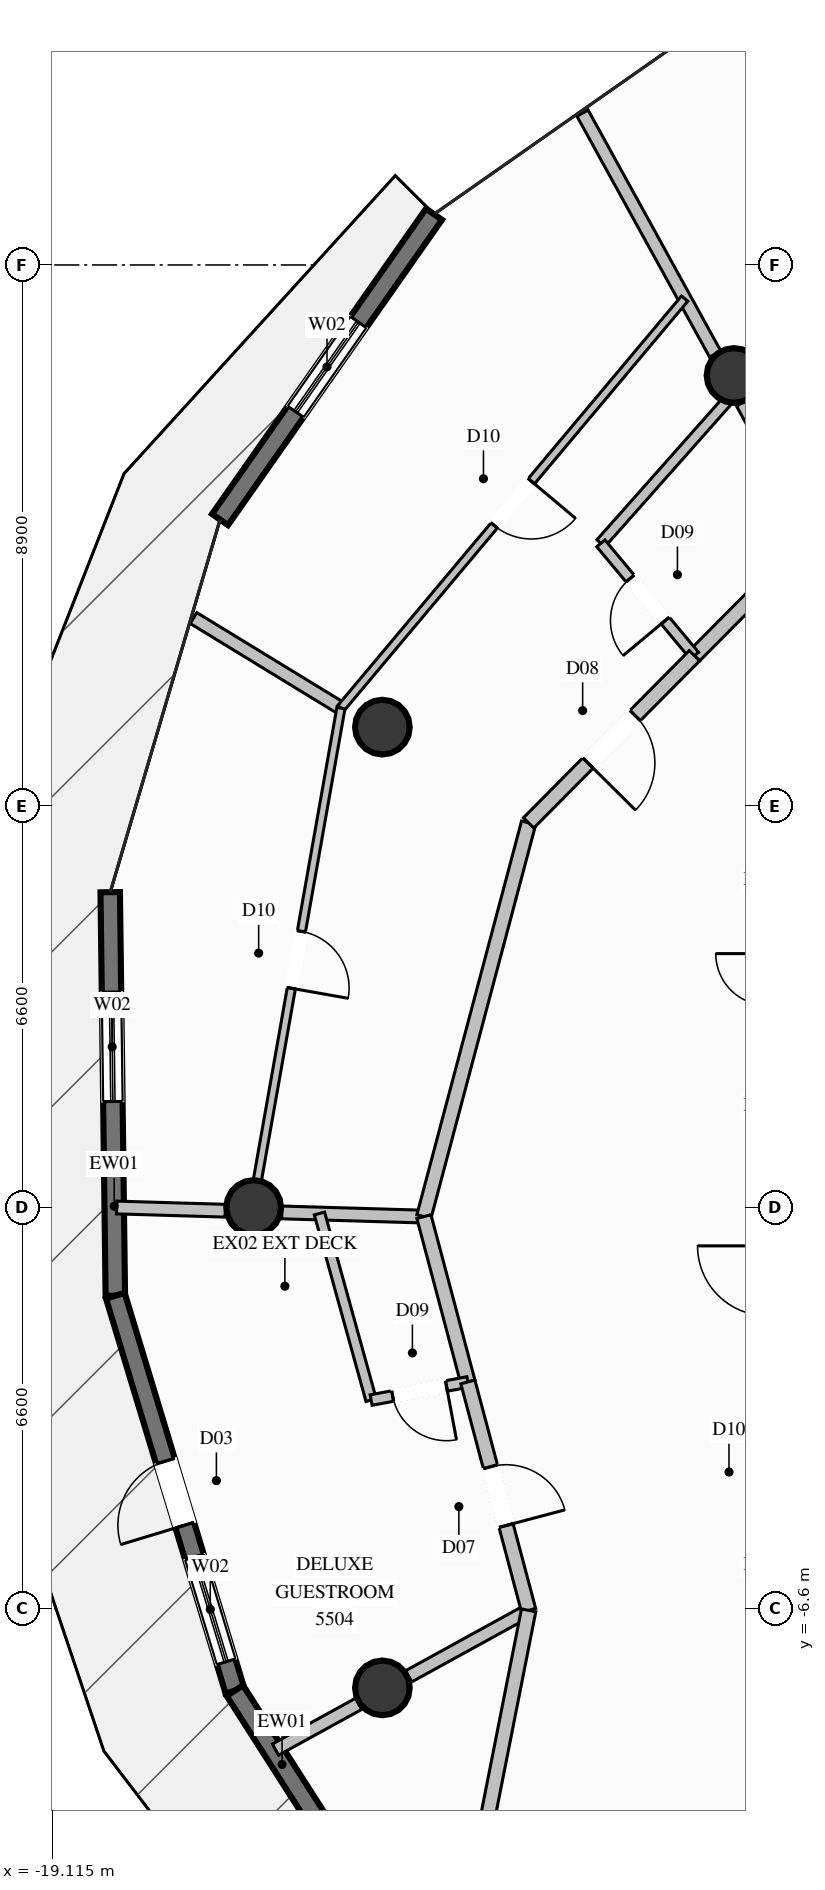
"""IFC4 building model, lengths in metres.
Left out: names, types, materials, properties, quantities, classifications, styles, units other than length and angle.
Written with IfcOpenShell. Run it as: python <this file> out.ifc"""

import sys

from ifc_helpers import new_model, si_unit, direction, frame, frame_2d, origin, origin_2d, place, context, subcontext, project, spatial, rectangle, circle, extrude, element, fill, save


model = new_model("IFC4")
c1 = context("Model", 3, precision=1e-05, world=origin(), true_north=direction((0.0, 1.0)))
c2 = subcontext(c1, "Body", "Model", "MODEL_VIEW")
j1 = project(units=[si_unit("LENGTHUNIT", "METRE"), si_unit("PLANEANGLEUNIT", "RADIAN")], contexts=[c1])
p1 = place(None, origin())
s1 = spatial("IfcSite", under=j1, at=p1, CompositionType="ELEMENT")
p2 = place(p1, origin())
s2 = spatial("IfcBuilding", under=s1, at=p2, CompositionType="ELEMENT")
p3 = place(p2, frame((0.0, 0.0, 205.6)))
s3 = spatial("IfcBuildingStorey", under=s2, at=p3, CompositionType="ELEMENT", Elevation=205.6)
for number, where, z_axis, x_axis in (
    (1, (-7.9, 13.683, 0.0), (0.0, 0.0, 1.0), (1.0, 0.0, 0.0)),
    (2, (-13.683, 7.9, 0.0), (0.0, 0.0, 1.0), (1.0, 0.0, 0.0)),
    (3, (-15.8, 0.0, 0.0), (0.0, 0.0, 1.0), (1.0, 0.0, 0.0)),
    (4, (-13.683, -7.9, 0.0), (0.0, 0.0, 1.0), (1.0, 0.0, 0.0)),
):
    element("IfcColumn", number, at=place(p3, frame(where, z_axis=z_axis, x_axis=x_axis)), inside=s3, PredefinedType="COLUMN", context=c2, shape_type="SweptSolid", body=[
        extrude(circle(Radius=0.45, at=origin_2d()), origin(), (0.0, 0.0, 1.0), 3.6),
    ])
p4 = place(p3, frame((-16.353, 11.313, 0.0), z_axis=(0.0, 0.0, 1.0), x_axis=(0.573863076695, 0.818951261802, 0.0)))
e5 = element("IfcWall", 5, at=p4, inside=s3, PredefinedType="SOLIDWALL", context=c2, shape_type="SweptSolid", body=[
    extrude(rectangle(XDim=6.132, YDim=0.32, at=frame_2d((3.066, 0.0))), origin(), (0.0, 0.0, 1.0), 3.36),
])
p5 = place(p4, frame((2.166, 0.0, 0.35)))
e6 = element("IfcOpeningElement", 6, at=p5, cuts=e5, PredefinedType="OPENING", context=c2, shape_type="SweptSolid", body=[
    extrude(rectangle(XDim=1.8, YDim=2.6, at=frame_2d((0.9, 1.3))), frame((0.0, 0.17, 0.0), z_axis=(0.0, -1.0, 0.0), x_axis=(1.0, 0.0, 0.0)), (0.0, 0.0, 1.0), 0.34),
])
p6 = place(p3, frame((-18.075, -1.451, 0.0), z_axis=(0.0, 0.0, 1.0), x_axis=(-0.012654885904, 0.999919923725, 0.0)))
e7 = element("IfcWall", 7, at=p6, inside=s3, PredefinedType="SOLIDWALL", context=c2, shape_type="SweptSolid", body=[
    extrude(rectangle(XDim=6.636, YDim=0.32, at=frame_2d((3.318, 0.0))), origin(), (0.0, 0.0, 1.0), 3.36),
])
p7 = place(p6, frame((3.194, 0.0, 0.35)))
e8 = element("IfcOpeningElement", 8, at=p7, cuts=e7, PredefinedType="OPENING", context=c2, shape_type="SweptSolid", body=[
    extrude(rectangle(XDim=1.8, YDim=2.6, at=frame_2d((0.9, 1.3))), frame((0.0, 0.17, 0.0), z_axis=(0.0, -1.0, 0.0), x_axis=(1.0, 0.0, 0.0)), (0.0, 0.0, 1.0), 0.34),
])
p8 = place(p3, frame((-16.109, -7.945, 0.0), z_axis=(0.0, 0.0, 1.0), x_axis=(-0.289756727298, 0.957100328589, 0.0)))
e9 = element("IfcWall", 9, at=p8, inside=s3, PredefinedType="SOLIDWALL", context=c2, shape_type="SweptSolid", body=[
    extrude(rectangle(XDim=6.785, YDim=0.32, at=frame_2d((3.393, 0.0))), origin(), (0.0, 0.0, 1.0), 3.36),
])
p9 = place(p8, frame((0.496, 0.0, 0.35)))
e10 = element("IfcOpeningElement", 10, at=p9, cuts=e9, PredefinedType="OPENING", context=c2, shape_type="SweptSolid", body=[
    extrude(rectangle(XDim=1.8, YDim=2.6, at=frame_2d((0.9, 1.3))), frame((0.0, 0.17, 0.0), z_axis=(0.0, -1.0, 0.0), x_axis=(1.0, 0.0, 0.0)), (0.0, 0.0, 1.0), 0.34),
])
p10 = place(p8, frame((2.843, 0.0, 0.0)))
e11 = element("IfcOpeningElement", 11, at=p10, cuts=e9, PredefinedType="OPENING", context=c2, shape_type="SweptSolid", body=[
    extrude(rectangle(XDim=1.1, YDim=2.2, at=frame_2d((0.55, 1.1))), frame((0.0, 0.17, 0.0), z_axis=(0.0, -1.0, 0.0), x_axis=(1.0, 0.0, 0.0)), (0.0, 0.0, 1.0), 0.34),
])
p11 = place(p3, frame((-12.454, -13.662, 0.0), z_axis=(0.0, 0.0, 1.0), x_axis=(-0.538622762642, 0.842547042938, 0.0)))
e12 = element("IfcWall", 12, at=p11, inside=s3, PredefinedType="SOLIDWALL", context=c2, shape_type="SweptSolid", body=[
    extrude(rectangle(XDim=6.785, YDim=0.32, at=frame_2d((3.393, 0.0))), origin(), (0.0, 0.0, 1.0), 3.36),
])
p12 = place(p11, frame((1.854, 0.0, 0.35)))
e13 = element("IfcOpeningElement", 13, at=p12, cuts=e12, PredefinedType="OPENING", context=c2, shape_type="SweptSolid", body=[
    extrude(rectangle(XDim=1.8, YDim=2.6, at=frame_2d((0.9, 1.3))), frame((0.0, 0.17, 0.0), z_axis=(0.0, -1.0, 0.0), x_axis=(1.0, 0.0, 0.0)), (0.0, 0.0, 1.0), 0.34),
])
p13 = place(p3, frame((-6.575, 11.065, 0.0), z_axis=(0.0, 0.0, 1.0), x_axis=(-0.482312715348, 0.875999112222, 0.0)))
e14 = element("IfcWall", 14, at=p13, inside=s3, PredefinedType="PARTITIONING", context=c2, shape_type="SweptSolid", body=[
    extrude(rectangle(XDim=2.474, YDim=0.21, at=frame_2d((1.237, 0.0))), origin(), (0.0, 0.0, 1.0), 2.877),
])
p14 = place(p3, frame((-8.21, 14.036, 0.0), z_axis=(0.0, 0.0, 1.0), x_axis=(-0.482343563711, 0.875982126842, 0.0)))
e15 = element("IfcWall", 15, at=p14, inside=s3, PredefinedType="PARTITIONING", context=c2, shape_type="SweptSolid", body=[
    extrude(rectangle(XDim=4.522, YDim=0.21, at=frame_2d((2.261, 0.0))), origin(), (0.0, 0.0, 1.0), 3.36),
])
p15 = place(p3, frame((-13.0, -0.15, 0.0), z_axis=(0.0, 0.0, 1.0), x_axis=(-0.999566309164, 0.029448150771, 0.0)))
e16 = element("IfcWall", 16, at=p15, inside=s3, PredefinedType="PARTITIONING", context=c2, shape_type="SweptSolid", body=[
    extrude(rectangle(XDim=2.338, YDim=0.21, at=frame_2d((1.169, 0.0))), origin(), (0.0, 0.0, 1.0), 3.36),
])
p16 = place(p3, frame((-16.267, -0.053, 0.0), z_axis=(0.0, 0.0, 1.0), x_axis=(-0.999560281957, 0.029652027503, 0.0)))
e17 = element("IfcWall", 17, at=p16, inside=s3, PredefinedType="PARTITIONING", context=c2, shape_type="SweptSolid", body=[
    extrude(rectangle(XDim=1.787, YDim=0.21, at=frame_2d((0.893, 0.0))), origin(), (0.0, 0.0, 1.0), 3.36),
])
p17 = place(p3, frame((-11.278, -6.625, 0.0), z_axis=(0.0, 0.0, 1.0), x_axis=(-0.876259360779, -0.481839737513, 0.0)))
e18 = element("IfcWall", 18, at=p17, inside=s3, PredefinedType="PARTITIONING", context=c2, shape_type="SweptSolid", body=[
    extrude(rectangle(XDim=2.254, YDim=0.21, at=frame_2d((1.127, 0.0))), origin(), (0.0, 0.0, 1.0), 2.877),
])
p18 = place(p3, frame((-14.073, -8.162, 0.0), z_axis=(0.0, 0.0, 1.0), x_axis=(-0.876060708042, -0.482200825201, 0.0)))
e19 = element("IfcWall", 19, at=p18, inside=s3, PredefinedType="PARTITIONING", context=c2, shape_type="SweptSolid", body=[
    extrude(rectangle(XDim=1.562, YDim=0.21, at=frame_2d((0.781, 0.0))), origin(), (0.0, 0.0, 1.0), 3.36),
])
p19 = place(p3, frame((-6.575, 11.065, 0.0), z_axis=(0.0, 0.0, 1.0), x_axis=(-0.704271845888, -0.709930395947, 0.0)))
e20 = element("IfcWall", 20, at=p19, inside=s3, PredefinedType="PARTITIONING", context=c2, shape_type="SweptSolid", body=[
    extrude(rectangle(XDim=2.804, YDim=0.24, at=frame_2d((1.402, 0.0))), origin(), (0.0, 0.0, 1.0), 3.36),
])
p20 = place(p3, frame((-7.872, 13.422, 0.0), z_axis=(0.0, 0.0, 1.0), x_axis=(-0.663660752153, -0.748033693126, 0.0)))
e21 = element("IfcWall", 21, at=p20, inside=s3, PredefinedType="PLUMBINGWALL", context=c2, shape_type="SweptSolid", body=[
    extrude(rectangle(XDim=3.342, YDim=0.175, at=frame_2d((1.671, 0.0))), origin(), (0.0, 0.0, 1.0), 2.929),
])
p21 = place(p3, frame((-8.55, 9.074, 0.0), z_axis=(0.0, 0.0, 1.0), x_axis=(-0.640164435278, 0.768237916147, 0.0)))
e22 = element("IfcWall", 22, at=p21, inside=s3, PredefinedType="PLUMBINGWALL", context=c2, shape_type="SweptSolid", body=[
    extrude(rectangle(XDim=2.406, YDim=0.175, at=frame_2d((1.203, 0.0))), origin(), (0.0, 0.0, 1.0), 3.36),
])
p22 = place(p21, frame((0.753, 0.0, 0.0)))
e23 = element("IfcOpeningElement", 23, at=p22, cuts=e22, PredefinedType="OPENING", context=c2, shape_type="SweptSolid", body=[
    extrude(rectangle(XDim=0.9, YDim=2.1, at=frame_2d((0.45, 1.05))), frame((0.0, 0.098, 0.0), z_axis=(0.0, -1.0, 0.0), x_axis=(1.0, 0.0, 0.0)), (0.0, 0.0, 1.0), 0.195),
])
p23 = place(p3, frame((-14.365, 8.212, 0.0), z_axis=(0.0, 0.0, 1.0), x_axis=(-0.853249981301, 0.521502127905, 0.0)))
e24 = element("IfcWall", 24, at=p23, inside=s3, PredefinedType="PARTITIONING", context=c2, shape_type="SweptSolid", body=[
    extrude(rectangle(XDim=2.842, YDim=0.21, at=frame_2d((1.421, 0.0))), origin(), (0.0, 0.0, 1.0), 3.36),
])
p24 = place(p3, frame((-11.278, 6.325, 0.0), z_axis=(0.0, 0.0, 1.0), x_axis=(-0.257007135557, -0.966409505475, 0.0)))
e25 = element("IfcWall", 25, at=p24, inside=s3, PredefinedType="PARTITIONING", context=c2, shape_type="SweptSolid", body=[
    extrude(rectangle(XDim=6.7, YDim=0.24, at=frame_2d((3.35, 0.0))), origin(), (0.0, 0.0, 1.0), 3.36),
])
p25 = place(p3, frame((-8.55, 9.074, 0.0), z_axis=(0.0, 0.0, 1.0), x_axis=(-0.704390934975, -0.709812236246, 0.0)))
e26 = element("IfcWall", 26, at=p25, inside=s3, PredefinedType="PARTITIONING", context=c2, shape_type="SweptSolid", body=[
    extrude(rectangle(XDim=3.873, YDim=0.24, at=frame_2d((1.937, 0.0))), origin(), (0.0, 0.0, 1.0), 3.36),
])
p26 = place(p25, frame((1.386, 0.0, 0.0)))
e27 = element("IfcOpeningElement", 27, at=p26, cuts=e26, PredefinedType="OPENING", context=c2, shape_type="SweptSolid", body=[
    extrude(rectangle(XDim=1.1, YDim=2.3, at=frame_2d((0.55, 1.15))), frame((0.0, 0.13, 0.0), z_axis=(0.0, -1.0, 0.0), x_axis=(1.0, 0.0, 0.0)), (0.0, 0.0, 1.0), 0.26),
])
p27 = place(p3, frame((-8.712, 14.947, 0.0), z_axis=(0.0, 0.0, 1.0), x_axis=(-0.642897719882, -0.765952036208, 0.0)))
e28 = element("IfcWall", 28, at=p27, inside=s3, PredefinedType="PARTITIONING", context=c2, shape_type="SweptSolid", body=[
    extrude(rectangle(XDim=8.793, YDim=0.135, at=frame_2d((4.396, 0.0))), origin(), (0.0, 0.0, 1.0), 3.36),
])
p28 = place(p27, frame((3.921, 0.0, 0.0)))
e29 = element("IfcOpeningElement", 29, at=p28, cuts=e28, PredefinedType="OPENING", context=c2, shape_type="SweptSolid", body=[
    extrude(rectangle(XDim=0.95, YDim=2.1, at=frame_2d((0.475, 1.05))), frame((0.0, 0.078, 0.0), z_axis=(0.0, -1.0, 0.0), x_axis=(1.0, 0.0, 0.0)), (0.0, 0.0, 1.0), 0.155),
])
p29 = place(p3, frame((-14.365, 8.212, 0.0), z_axis=(0.0, 0.0, 1.0), x_axis=(-0.174280681656, -0.984696016038, 0.0)))
e30 = element("IfcWall", 30, at=p29, inside=s3, PredefinedType="PARTITIONING", context=c2, shape_type="SweptSolid", body=[
    extrude(rectangle(XDim=8.406, YDim=0.135, at=frame_2d((4.203, 0.0))), origin(), (0.0, 0.0, 1.0), 2.929),
])
p30 = place(p29, frame((3.728, 0.0, 0.0)))
e31 = element("IfcOpeningElement", 31, at=p30, cuts=e30, PredefinedType="OPENING", context=c2, shape_type="SweptSolid", body=[
    extrude(rectangle(XDim=0.95, YDim=2.1, at=frame_2d((0.475, 1.05))), frame((0.0, 0.078, 0.0), z_axis=(0.0, -1.0, 0.0), x_axis=(1.0, 0.0, 0.0)), (0.0, 0.0, 1.0), 0.155),
])
p31 = place(p3, frame((-13.0, -0.15, 0.0), z_axis=(0.0, 0.0, 1.0), x_axis=(0.256944245483, -0.966426228283, 0.0)))
e32 = element("IfcWall", 32, at=p31, inside=s3, PredefinedType="PARTITIONING", context=c2, shape_type="SweptSolid", body=[
    extrude(rectangle(XDim=2.813, YDim=0.24, at=frame_2d((1.407, 0.0))), origin(), (0.0, 0.0, 1.0), 3.36),
])
p32 = place(p3, frame((-14.718, -0.099, 0.0), z_axis=(0.0, 0.0, 1.0), x_axis=(0.267034684906, -0.963686918588, 0.0)))
e33 = element("IfcWall", 33, at=p32, inside=s3, PredefinedType="PLUMBINGWALL", context=c2, shape_type="SweptSolid", body=[
    extrude(rectangle(XDim=3.184, YDim=0.175, at=frame_2d((1.592, 0.0))), origin(), (0.0, 0.0, 1.0), 3.36),
])
p33 = place(p3, frame((-12.277, -2.869, 0.0), z_axis=(0.0, 0.0, 1.0), x_axis=(-0.982892672731, -0.184179243923, 0.0)))
e34 = element("IfcWall", 34, at=p33, inside=s3, PredefinedType="PLUMBINGWALL", context=c2, shape_type="SweptSolid", body=[
    extrude(rectangle(XDim=1.618, YDim=0.175, at=frame_2d((0.809, 0.0))), origin(), (0.0, 0.0, 1.0), 3.36),
])
p34 = place(p33, frame((0.359, 0.0, 0.0)))
e35 = element("IfcOpeningElement", 35, at=p34, cuts=e34, PredefinedType="OPENING", context=c2, shape_type="SweptSolid", body=[
    extrude(rectangle(XDim=0.9, YDim=2.1, at=frame_2d((0.45, 1.05))), frame((0.0, 0.098, 0.0), z_axis=(0.0, -1.0, 0.0), x_axis=(1.0, 0.0, 0.0)), (0.0, 0.0, 1.0), 0.195),
])
p35 = place(p3, frame((-12.277, -2.869, 0.0), z_axis=(0.0, 0.0, 1.0), x_axis=(0.257037057674, -0.966401547486, 0.0)))
e36 = element("IfcWall", 36, at=p35, inside=s3, PredefinedType="PARTITIONING", context=c2, shape_type="SweptSolid", body=[
    extrude(rectangle(XDim=3.887, YDim=0.24, at=frame_2d((1.943, 0.0))), origin(), (0.0, 0.0, 1.0), 3.36),
])
p36 = place(p35, frame((1.443, 0.0, 0.0)))
e37 = element("IfcOpeningElement", 37, at=p36, cuts=e36, PredefinedType="OPENING", context=c2, shape_type="SweptSolid", body=[
    extrude(rectangle(XDim=1.0, YDim=2.2, at=frame_2d((0.5, 1.1))), frame((0.0, 0.13, 0.0), z_axis=(0.0, -1.0, 0.0), x_axis=(1.0, 0.0, 0.0)), (0.0, 0.0, 1.0), 0.26),
])
p37 = place(p3, frame((-11.278, -6.625, 0.0), z_axis=(0.0, 0.0, 1.0), x_axis=(-0.193739123744, -0.981053083136, 0.0)))
e38 = element("IfcWall", 38, at=p37, inside=s3, PredefinedType="PARTITIONING", context=c2, shape_type="SweptSolid", body=[
    extrude(rectangle(XDim=5.275, YDim=0.24, at=frame_2d((2.637, 0.0))), origin(), (0.0, 0.0, 1.0), 3.36),
])
p38 = place(p5, origin())
e39 = element("IfcWindow", 39, at=p38, inside=s3, PartitioningType="SINGLE_PANEL", PredefinedType="WINDOW", context=c2, shape_type="SweptSolid", body=[
    extrude(rectangle(XDim=1.8, YDim=2.6, at=frame_2d((0.9, 1.3))), frame((0.0, 0.03, 0.0), z_axis=(0.0, -1.0, 0.0), x_axis=(1.0, 0.0, 0.0)), (0.0, 0.0, 1.0), 0.06),
])
fill(e6, e39)
p39 = place(p7, origin())
e40 = element("IfcWindow", 40, at=p39, inside=s3, PartitioningType="SINGLE_PANEL", PredefinedType="WINDOW", context=c2, shape_type="SweptSolid", body=[
    extrude(rectangle(XDim=1.8, YDim=2.6, at=frame_2d((0.9, 1.3))), frame((0.0, 0.03, 0.0), z_axis=(0.0, -1.0, 0.0), x_axis=(1.0, 0.0, 0.0)), (0.0, 0.0, 1.0), 0.06),
])
fill(e8, e40)
p40 = place(p9, origin())
e41 = element("IfcWindow", 41, at=p40, inside=s3, PartitioningType="SINGLE_PANEL", PredefinedType="WINDOW", context=c2, shape_type="SweptSolid", body=[
    extrude(rectangle(XDim=1.8, YDim=2.6, at=frame_2d((0.9, 1.3))), frame((0.0, 0.03, 0.0), z_axis=(0.0, -1.0, 0.0), x_axis=(1.0, 0.0, 0.0)), (0.0, 0.0, 1.0), 0.06),
])
fill(e10, e41)
p41 = place(p10, origin())
e42 = element("IfcDoor", 42, at=p41, inside=s3, OperationType="SINGLE_SWING_LEFT", PredefinedType="DOOR", context=c2, shape_type="SweptSolid", body=[
    extrude(rectangle(XDim=1.1, YDim=2.2, at=frame_2d((0.55, 1.1))), frame((0.0, 0.025, 0.0), z_axis=(0.0, -1.0, 0.0), x_axis=(1.0, 0.0, 0.0)), (0.0, 0.0, 1.0), 0.05),
])
fill(e11, e42)
p42 = place(p22, origin())
e43 = element("IfcDoor", 43, at=p42, inside=s3, OperationType="SINGLE_SWING_LEFT", PredefinedType="DOOR", context=c2, shape_type="SweptSolid", body=[
    extrude(rectangle(XDim=0.9, YDim=2.1, at=frame_2d((0.45, 1.05))), frame((0.0, 0.025, 0.0), z_axis=(0.0, -1.0, 0.0), x_axis=(1.0, 0.0, 0.0)), (0.0, 0.0, 1.0), 0.05),
])
fill(e23, e43)
p43 = place(p26, origin())
e44 = element("IfcDoor", 44, at=p43, inside=s3, OperationType="SINGLE_SWING_RIGHT", PredefinedType="DOOR", context=c2, shape_type="SweptSolid", body=[
    extrude(rectangle(XDim=1.1, YDim=2.3, at=frame_2d((0.55, 1.15))), frame((0.0, 0.025, 0.0), z_axis=(0.0, -1.0, 0.0), x_axis=(1.0, 0.0, 0.0)), (0.0, 0.0, 1.0), 0.05),
])
fill(e27, e44)
p44 = place(p28, origin())
e45 = element("IfcDoor", 45, at=p44, inside=s3, OperationType="SINGLE_SWING_LEFT", PredefinedType="DOOR", context=c2, shape_type="SweptSolid", body=[
    extrude(rectangle(XDim=0.95, YDim=2.1, at=frame_2d((0.475, 1.05))), frame((0.0, 0.025, 0.0), z_axis=(0.0, -1.0, 0.0), x_axis=(1.0, 0.0, 0.0)), (0.0, 0.0, 1.0), 0.05),
])
fill(e29, e45)
p45 = place(p30, origin())
e46 = element("IfcDoor", 46, at=p45, inside=s3, OperationType="SINGLE_SWING_RIGHT", PredefinedType="DOOR", context=c2, shape_type="SweptSolid", body=[
    extrude(rectangle(XDim=0.95, YDim=2.1, at=frame_2d((0.475, 1.05))), frame((0.0, 0.025, 0.0), z_axis=(0.0, -1.0, 0.0), x_axis=(1.0, 0.0, 0.0)), (0.0, 0.0, 1.0), 0.05),
])
fill(e31, e46)
p46 = place(p34, origin())
e47 = element("IfcDoor", 47, at=p46, inside=s3, OperationType="SINGLE_SWING_LEFT", PredefinedType="DOOR", context=c2, shape_type="SweptSolid", body=[
    extrude(rectangle(XDim=0.9, YDim=2.1, at=frame_2d((0.45, 1.05))), frame((0.0, 0.025, 0.0), z_axis=(0.0, -1.0, 0.0), x_axis=(1.0, 0.0, 0.0)), (0.0, 0.0, 1.0), 0.05),
])
fill(e35, e47)
p47 = place(p36, origin())
e48 = element("IfcDoor", 48, at=p47, inside=s3, OperationType="SINGLE_SWING_RIGHT", PredefinedType="DOOR", context=c2, shape_type="SweptSolid", body=[
    extrude(rectangle(XDim=1.0, YDim=2.2, at=frame_2d((0.5, 1.1))), frame((0.0, 0.025, 0.0), z_axis=(0.0, -1.0, 0.0), x_axis=(1.0, 0.0, 0.0)), (0.0, 0.0, 1.0), 0.05),
])
fill(e37, e48)
save(model, sys.argv[1])
